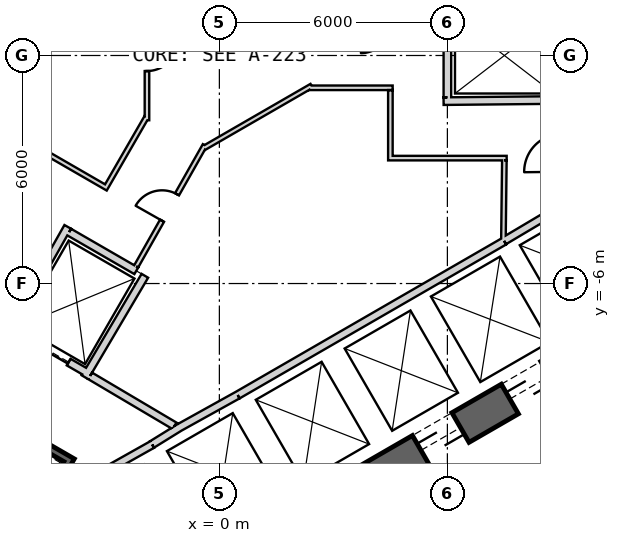
"""IFC4 building model, lengths in metres.
Left out: names, types, materials, properties, quantities, classifications, styles, units other than length and angle.
Written with IfcOpenShell. Run it as: python <this file> out.ifc"""

import sys

from ifc_helpers import new_model, si_unit, direction, frame, frame_2d, origin, place, context, subcontext, project, spatial, rectangle, extrude, element, fill, save


model = new_model("IFC4")
c1 = context("Model", 3, precision=1e-05, world=origin(), true_north=direction((0.0, 1.0)))
c2 = subcontext(c1, "Body", "Model", "MODEL_VIEW")
j1 = project(units=[si_unit("LENGTHUNIT", "METRE"), si_unit("PLANEANGLEUNIT", "RADIAN")], contexts=[c1])
p1 = place(None, origin())
s1 = spatial("IfcSite", under=j1, at=p1, CompositionType="ELEMENT")
p2 = place(p1, origin())
s2 = spatial("IfcBuilding", under=s1, at=p2, CompositionType="ELEMENT")
p3 = place(p2, frame((0.0, 0.0, 193.2)))
s3 = spatial("IfcBuildingStorey", under=s2, at=p3, CompositionType="ELEMENT", Elevation=193.2)
p4 = place(p3, frame((-7.825, -17.97, 0.0), z_axis=(0.0, 0.0, 1.0), x_axis=(0.866028369851, 0.499994862586, 0.0)))
e1 = element("IfcWall", 1, at=p4, inside=s3, PredefinedType="SHEAR", context=c2, shape_type="SweptSolid", body=[
    extrude(rectangle(XDim=31.523, YDim=0.9, at=frame_2d((15.762, 0.0))), origin(), (0.0, 0.0, 1.0), 4.0),
])
p5 = place(p4, frame((7.062, 0.0, 0.0)))
e2 = element("IfcOpeningElement", 2, at=p5, cuts=e1, PredefinedType="OPENING", context=c2, shape_type="SweptSolid", body=[
    extrude(rectangle(XDim=1.2, YDim=2.4, at=frame_2d((0.6, 1.2))), frame((0.0, 0.46, 0.0), z_axis=(0.0, -1.0, 0.0), x_axis=(1.0, 0.0, 0.0)), (0.0, 0.0, 1.0), 0.92),
])
p6 = place(p4, frame((9.762, 0.0, 0.0)))
e3 = element("IfcOpeningElement", 3, at=p6, cuts=e1, PredefinedType="OPENING", context=c2, shape_type="SweptSolid", body=[
    extrude(rectangle(XDim=1.2, YDim=2.4, at=frame_2d((0.6, 1.2))), frame((0.0, 0.46, 0.0), z_axis=(0.0, -1.0, 0.0), x_axis=(1.0, 0.0, 0.0)), (0.0, 0.0, 1.0), 0.92),
])
p7 = place(p4, frame((12.462, 0.0, 0.0)))
e4 = element("IfcOpeningElement", 4, at=p7, cuts=e1, PredefinedType="OPENING", context=c2, shape_type="SweptSolid", body=[
    extrude(rectangle(XDim=1.2, YDim=2.4, at=frame_2d((0.6, 1.2))), frame((0.0, 0.46, 0.0), z_axis=(0.0, -1.0, 0.0), x_axis=(1.0, 0.0, 0.0)), (0.0, 0.0, 1.0), 0.92),
])
p8 = place(p4, frame((15.162, 0.0, 0.0)))
e5 = element("IfcOpeningElement", 5, at=p8, cuts=e1, PredefinedType="OPENING", context=c2, shape_type="SweptSolid", body=[
    extrude(rectangle(XDim=1.2, YDim=2.4, at=frame_2d((0.6, 1.2))), frame((0.0, 0.46, 0.0), z_axis=(0.0, -1.0, 0.0), x_axis=(1.0, 0.0, 0.0)), (0.0, 0.0, 1.0), 0.92),
])
p9 = place(p4, frame((17.862, 0.0, 0.0)))
e6 = element("IfcOpeningElement", 6, at=p9, cuts=e1, PredefinedType="OPENING", context=c2, shape_type="SweptSolid", body=[
    extrude(rectangle(XDim=1.2, YDim=2.4, at=frame_2d((0.6, 1.2))), frame((0.0, 0.46, 0.0), z_axis=(0.0, -1.0, 0.0), x_axis=(1.0, 0.0, 0.0)), (0.0, 0.0, 1.0), 0.92),
])
p10 = place(p4, frame((20.562, 0.0, 0.0)))
e7 = element("IfcOpeningElement", 7, at=p10, cuts=e1, PredefinedType="OPENING", context=c2, shape_type="SweptSolid", body=[
    extrude(rectangle(XDim=1.2, YDim=2.4, at=frame_2d((0.6, 1.2))), frame((0.0, 0.46, 0.0), z_axis=(0.0, -1.0, 0.0), x_axis=(1.0, 0.0, 0.0)), (0.0, 0.0, 1.0), 0.92),
])
p11 = place(p4, frame((26.712, 0.0, 0.0)))
e8 = element("IfcOpeningElement", 8, at=p11, cuts=e1, PredefinedType="OPENING", context=c2, shape_type="SweptSolid", body=[
    extrude(rectangle(XDim=1.2, YDim=2.4, at=frame_2d((0.6, 1.2))), frame((0.0, 0.46, 0.0), z_axis=(0.0, -1.0, 0.0), x_axis=(1.0, 0.0, 0.0)), (0.0, 0.0, 1.0), 0.92),
])
p12 = place(p4, frame((3.612, 0.0, 0.0)))
e9 = element("IfcOpeningElement", 9, at=p12, cuts=e1, PredefinedType="OPENING", context=c2, shape_type="SweptSolid", body=[
    extrude(rectangle(XDim=1.2, YDim=2.4, at=frame_2d((0.6, 1.2))), frame((0.0, 0.46, 0.0), z_axis=(0.0, -1.0, 0.0), x_axis=(1.0, 0.0, 0.0)), (0.0, 0.0, 1.0), 0.92),
])
p13 = place(p3, frame((0.483, -8.936, 0.0), z_axis=(0.0, 0.0, 1.0), x_axis=(0.866030989016, 0.499990325971, 0.0)))
e10 = element("IfcWall", 10, at=p13, inside=s3, PredefinedType="PLUMBINGWALL", context=c2, shape_type="SweptSolid", body=[
    extrude(rectangle(XDim=8.1, YDim=0.2, at=frame_2d((4.05, 0.0))), origin(), (0.0, 0.0, 1.0), 3.7),
])
p14 = place(p3, frame((7.493, -4.878, 0.0), z_axis=(0.0, 0.0, 1.0), x_axis=(0.859981807212, 0.510324691999, 0.0)))
e11 = element("IfcWall", 11, at=p14, inside=s3, PredefinedType="PLUMBINGWALL", context=c2, shape_type="SweptSolid", body=[
    extrude(rectangle(XDim=1.845, YDim=0.2, at=frame_2d((0.922, 0.0))), origin(), (0.0, 0.0, 1.0), 3.7),
])
p15 = place(p3, frame((-1.769, -10.237, 0.0), z_axis=(0.0, 0.0, 1.0), x_axis=(-0.871534483978, -0.490334215854, 0.0)))
e12 = element("IfcWall", 12, at=p15, inside=s3, PredefinedType="PLUMBINGWALL", context=c2, shape_type="SweptSolid", body=[
    extrude(rectangle(XDim=2.7, YDim=0.2, at=frame_2d((1.35, 0.0))), origin(), (0.0, 0.0, 1.0), 3.7),
])
p16 = place(p3, frame((-1.024, -9.771, 0.0), z_axis=(0.0, 0.0, 1.0), x_axis=(-0.850348075135, -0.526220629693, 0.0)))
e13 = element("IfcWall", 13, at=p16, inside=s3, PredefinedType="PLUMBINGWALL", context=c2, shape_type="SweptSolid", body=[
    extrude(rectangle(XDim=0.878, YDim=0.2, at=frame_2d((0.439, 0.0))), origin(), (0.0, 0.0, 1.0), 3.7),
])
p17 = place(p3, frame((-1.13, -9.831, 0.0), z_axis=(0.0, 0.0, 1.0), x_axis=(0.874269620932, 0.485440655401, 0.0)))
e14 = element("IfcWall", 14, at=p17, inside=s3, PredefinedType="PLUMBINGWALL", context=c2, shape_type="SweptSolid", body=[
    extrude(rectangle(XDim=1.845, YDim=0.2, at=frame_2d((0.922, 0.0))), origin(), (0.0, 0.0, 1.0), 3.7),
])
p18 = place(p3, frame((5.9, -1.201, 0.0), z_axis=(0.0, 0.0, 1.0), x_axis=(0.999950064753, 0.009993397809, 0.0)))
e15 = element("IfcWall", 15, at=p18, inside=s3, PredefinedType="PLUMBINGWALL", context=c2, shape_type="SweptSolid", body=[
    extrude(rectangle(XDim=3.2, YDim=0.2, at=frame_2d((1.6, 0.0))), origin(), (0.0, 0.0, 1.0), 3.7),
])
p19 = place(p3, frame((6.0, -1.1, 0.0), z_axis=(0.0, 0.0, 1.0), x_axis=(0.0, 1.0, 0.0)))
e16 = element("IfcWall", 16, at=p19, inside=s3, PredefinedType="PLUMBINGWALL", context=c2, shape_type="SweptSolid", body=[
    extrude(rectangle(XDim=2.055, YDim=0.2, at=frame_2d((1.027, 0.0))), origin(), (0.0, 0.0, 1.0), 3.7),
])
p20 = place(p3, frame((-3.905, -10.563, -0.3), z_axis=(0.0, 0.0, 1.0), x_axis=(-0.500012932018, -0.866017937352, 0.0)))
e17 = element("IfcWall", 17, at=p20, inside=s3, PredefinedType="SHEAR", context=c2, shape_type="SweptSolid", body=[
    extrude(rectangle(XDim=8.1, YDim=0.2, at=frame_2d((4.05, 0.0))), origin(), (0.0, 0.0, 1.0), 4.0),
])
p21 = place(p3, frame((-4.041, -10.599, -0.3), z_axis=(0.0, 0.0, 1.0), x_axis=(-0.866047807691, 0.499961193289, 0.0)))
e18 = element("IfcWall", 18, at=p21, inside=s3, PredefinedType="SHEAR", context=c2, shape_type="SweptSolid", body=[
    extrude(rectangle(XDim=3.6, YDim=0.2, at=frame_2d((1.8, 0.0))), origin(), (0.0, 0.0, 1.0), 4.0),
])
p22 = place(p21, frame((1.25, 0.0, 0.3)))
e19 = element("IfcOpeningElement", 19, at=p22, cuts=e18, PredefinedType="OPENING", context=c2, shape_type="SweptSolid", body=[
    extrude(rectangle(XDim=1.1, YDim=2.1, at=frame_2d((0.55, 1.05))), frame((0.0, 0.11, 0.0), z_axis=(0.0, -1.0, 0.0), x_axis=(1.0, 0.0, 0.0)), (0.0, 0.0, 1.0), 0.22),
])
p23 = place(p3, frame((-3.446, -8.368, 0.0), z_axis=(0.0, 0.0, 1.0), x_axis=(-0.866024647952, 0.500001309137, 0.0)))
e20 = element("IfcWall", 20, at=p23, inside=s3, PredefinedType="PLUMBINGWALL", context=c2, shape_type="SweptSolid", body=[
    extrude(rectangle(XDim=2.4, YDim=0.2, at=frame_2d((1.2, 0.0))), origin(), (0.0, 0.0, 1.0), 3.7),
])
p24 = place(p23, frame((0.6, 0.0, 0.0)))
e21 = element("IfcOpeningElement", 21, at=p24, cuts=e20, PredefinedType="OPENING", context=c2, shape_type="SweptSolid", body=[
    extrude(rectangle(XDim=1.2, YDim=2.4, at=frame_2d((0.6, 1.2))), frame((0.0, 0.11, 0.0), z_axis=(0.0, -1.0, 0.0), x_axis=(1.0, 0.0, 0.0)), (0.0, 0.0, 1.0), 0.22),
])
p25 = place(p3, frame((-1.961, -5.796, 0.0), z_axis=(0.0, 0.0, 1.0), x_axis=(-0.508647062354, -0.860975125052, 0.0)))
e22 = element("IfcWall", 22, at=p25, inside=s3, PredefinedType="PLUMBINGWALL", context=c2, shape_type="SweptSolid", body=[
    extrude(rectangle(XDim=3.1, YDim=0.2, at=frame_2d((1.55, 0.0))), origin(), (0.0, 0.0, 1.0), 3.7),
])
p26 = place(p3, frame((-3.99, -4.509, 0.0), z_axis=(0.0, 0.0, 1.0), x_axis=(-0.491358283181, -0.870957540612, 0.0)))
e23 = element("IfcWall", 23, at=p26, inside=s3, PredefinedType="PLUMBINGWALL", context=c2, shape_type="SweptSolid", body=[
    extrude(rectangle(XDim=3.2, YDim=0.2, at=frame_2d((1.6, 0.0))), origin(), (0.0, 0.0, 1.0), 3.7),
])
p27 = place(p3, frame((-3.953, -4.646, 0.0), z_axis=(0.0, 0.0, 1.0), x_axis=(0.866032100247, -0.499988401207, 0.0)))
e24 = element("IfcWall", 24, at=p27, inside=s3, PredefinedType="PLUMBINGWALL", context=c2, shape_type="SweptSolid", body=[
    extrude(rectangle(XDim=2.04, YDim=0.2, at=frame_2d((1.02, 0.0))), origin(), (0.0, 0.0, 1.0), 3.7),
])
p28 = place(p3, frame((-3.401, -8.43, 0.0), z_axis=(0.0, 0.0, 1.0), x_axis=(0.860615607571, -0.509255118781, 0.0)))
e25 = element("IfcWall", 25, at=p28, inside=s3, PredefinedType="PARTITIONING", context=c2, shape_type="SweptSolid", body=[
    extrude(rectangle(XDim=2.581, YDim=0.2, at=frame_2d((1.29, 0.0))), origin(), (0.0, 0.0, 1.0), 3.7),
])
p29 = place(p3, frame((-0.383, -2.361, 0.0), z_axis=(0.0, 0.0, 1.0), x_axis=(-0.492992395315, -0.870033618983, 0.0)))
e26 = element("IfcWall", 26, at=p29, inside=s3, PredefinedType="PARTITIONING", context=c2, shape_type="SweptSolid", body=[
    extrude(rectangle(XDim=3.664, YDim=0.12, at=frame_2d((1.832, 0.0))), origin(), (0.0, 0.0, 1.0), 3.7),
])
p30 = place(p29, frame((1.483, 0.0, 0.0)))
e27 = element("IfcOpeningElement", 27, at=p30, cuts=e26, PredefinedType="OPENING", context=c2, shape_type="SweptSolid", body=[
    extrude(rectangle(XDim=0.8, YDim=2.1, at=frame_2d((0.4, 1.05))), frame((0.0, 0.07, 0.0), z_axis=(0.0, -1.0, 0.0), x_axis=(1.0, 0.0, 0.0)), (0.0, 0.0, 1.0), 0.14),
])
p31 = place(p3, frame((2.428, -0.798, 0.0), z_axis=(0.0, 0.0, 1.0), x_axis=(-0.866034586814, -0.499984094189, 0.0)))
e28 = element("IfcWall", 28, at=p31, inside=s3, PredefinedType="PARTITIONING", context=c2, shape_type="SweptSolid", body=[
    extrude(rectangle(XDim=3.285, YDim=0.12, at=frame_2d((1.642, 0.0))), origin(), (0.0, 0.0, 1.0), 3.7),
])
p32 = place(p3, frame((4.56, -0.85, 0.0), z_axis=(0.0, 0.0, 1.0), x_axis=(-1.0, 0.0, 0.0)))
e29 = element("IfcWall", 29, at=p32, inside=s3, PredefinedType="PARTITIONING", context=c2, shape_type="SweptSolid", body=[
    extrude(rectangle(XDim=2.203, YDim=0.12, at=frame_2d((1.102, 0.0))), origin(), (0.0, 0.0, 1.0), 3.7),
])
p33 = place(p3, frame((4.5, -2.76, 0.0), z_axis=(0.0, 0.0, 1.0), x_axis=(0.0, 1.0, 0.0)))
e30 = element("IfcWall", 30, at=p33, inside=s3, PredefinedType="PARTITIONING", context=c2, shape_type="SweptSolid", body=[
    extrude(rectangle(XDim=1.85, YDim=0.12, at=frame_2d((0.925, 0.0))), origin(), (0.0, 0.0, 1.0), 3.7),
])
p34 = place(p3, frame((7.56, -2.7, 0.0), z_axis=(0.0, 0.0, 1.0), x_axis=(-1.0, 0.0, 0.0)))
e31 = element("IfcWall", 31, at=p34, inside=s3, PredefinedType="PARTITIONING", context=c2, shape_type="SweptSolid", body=[
    extrude(rectangle(XDim=3.0, YDim=0.12, at=frame_2d((1.5, 0.0))), origin(), (0.0, 0.0, 1.0), 3.7),
])
p35 = place(p3, frame((7.475, -4.865, 0.0), z_axis=(0.0, 0.0, 1.0), x_axis=(0.011716133148, 0.999931363757, 0.0)))
e32 = element("IfcWall", 32, at=p35, inside=s3, PredefinedType="PARTITIONING", context=c2, shape_type="SweptSolid", body=[
    extrude(rectangle(XDim=2.105, YDim=0.12, at=frame_2d((1.052, 0.0))), origin(), (0.0, 0.0, 1.0), 3.7),
])
p36 = place(p3, frame((-1.905, -1.704, 0.0), z_axis=(0.0, 0.0, 1.0), x_axis=(0.0, 1.0, 0.0)))
e33 = element("IfcWall", 33, at=p36, inside=s3, PredefinedType="PARTITIONING", context=c2, shape_type="SweptSolid", body=[
    extrude(rectangle(XDim=3.285, YDim=0.12, at=frame_2d((1.643, 0.0))), origin(), (0.0, 0.0, 1.0), 3.7),
])
p37 = place(p36, frame((1.295, 0.0, 0.0)))
e34 = element("IfcOpeningElement", 34, at=p37, cuts=e33, PredefinedType="OPENING", context=c2, shape_type="SweptSolid", body=[
    extrude(rectangle(XDim=0.8, YDim=2.1, at=frame_2d((0.4, 1.05))), frame((0.0, 0.07, 0.0), z_axis=(0.0, -1.0, 0.0), x_axis=(1.0, 0.0, 0.0)), (0.0, 0.0, 1.0), 0.14),
])
p38 = place(p3, frame((-3.016, -3.524, 0.0), z_axis=(0.0, 0.0, 1.0), x_axis=(0.499952654668, 0.866052736899, 0.0)))
e35 = element("IfcWall", 35, at=p38, inside=s3, PredefinedType="PARTITIONING", context=c2, shape_type="SweptSolid", body=[
    extrude(rectangle(XDim=2.203, YDim=0.12, at=frame_2d((1.102, 0.0))), origin(), (0.0, 0.0, 1.0), 3.7),
])
p39 = place(p3, frame((-4.641, -2.517, 0.0), z_axis=(0.0, 0.0, 1.0), x_axis=(0.866042797968, -0.49996987118, 0.0)))
e36 = element("IfcWall", 36, at=p39, inside=s3, PredefinedType="PARTITIONING", context=c2, shape_type="SweptSolid", body=[
    extrude(rectangle(XDim=1.851, YDim=0.12, at=frame_2d((0.925, 0.0))), origin(), (0.0, 0.0, 1.0), 3.7),
])
p40 = place(p24, origin())
e37 = element("IfcDoor", 37, at=p40, inside=s3, OperationType="SLIDING_TO_LEFT", PredefinedType="USERDEFINED", context=c2, shape_type="SweptSolid", body=[
    extrude(rectangle(XDim=1.2, YDim=2.4, at=frame_2d((0.6, 1.2))), frame((0.0, 0.025, 0.0), z_axis=(0.0, -1.0, 0.0), x_axis=(1.0, 0.0, 0.0)), (0.0, 0.0, 1.0), 0.05),
])
fill(e21, e37)
p41 = place(p30, origin())
e38 = element("IfcDoor", 38, at=p41, inside=s3, OperationType="SINGLE_SWING_RIGHT", PredefinedType="USERDEFINED", context=c2, shape_type="SweptSolid", body=[
    extrude(rectangle(XDim=0.8, YDim=2.1, at=frame_2d((0.4, 1.05))), frame((0.0, 0.025, 0.0), z_axis=(0.0, -1.0, 0.0), x_axis=(1.0, 0.0, 0.0)), (0.0, 0.0, 1.0), 0.05),
])
fill(e27, e38)
p42 = place(p37, origin())
e39 = element("IfcDoor", 39, at=p42, inside=s3, OperationType="SINGLE_SWING_LEFT", PredefinedType="USERDEFINED", context=c2, shape_type="SweptSolid", body=[
    extrude(rectangle(XDim=0.8, YDim=2.1, at=frame_2d((0.4, 1.05))), frame((0.0, 0.025, 0.0), z_axis=(0.0, -1.0, 0.0), x_axis=(1.0, 0.0, 0.0)), (0.0, 0.0, 1.0), 0.05),
])
fill(e34, e39)
p43 = place(p8, origin())
e40 = element("IfcDoor", 40, at=p43, inside=s3, OperationType="SLIDING_TO_LEFT", PredefinedType="USERDEFINED", context=c2, shape_type="SweptSolid", body=[
    extrude(rectangle(XDim=1.2, YDim=2.4, at=frame_2d((0.6, 1.2))), frame((0.0, 0.025, 0.0), z_axis=(0.0, -1.0, 0.0), x_axis=(1.0, 0.0, 0.0)), (0.0, 0.0, 1.0), 0.05),
])
fill(e5, e40)
p44 = place(p9, origin())
e41 = element("IfcDoor", 41, at=p44, inside=s3, OperationType="SLIDING_TO_LEFT", PredefinedType="USERDEFINED", context=c2, shape_type="SweptSolid", body=[
    extrude(rectangle(XDim=1.2, YDim=2.4, at=frame_2d((0.6, 1.2))), frame((0.0, 0.025, 0.0), z_axis=(0.0, -1.0, 0.0), x_axis=(1.0, 0.0, 0.0)), (0.0, 0.0, 1.0), 0.05),
])
fill(e6, e41)
save(model, sys.argv[1])
